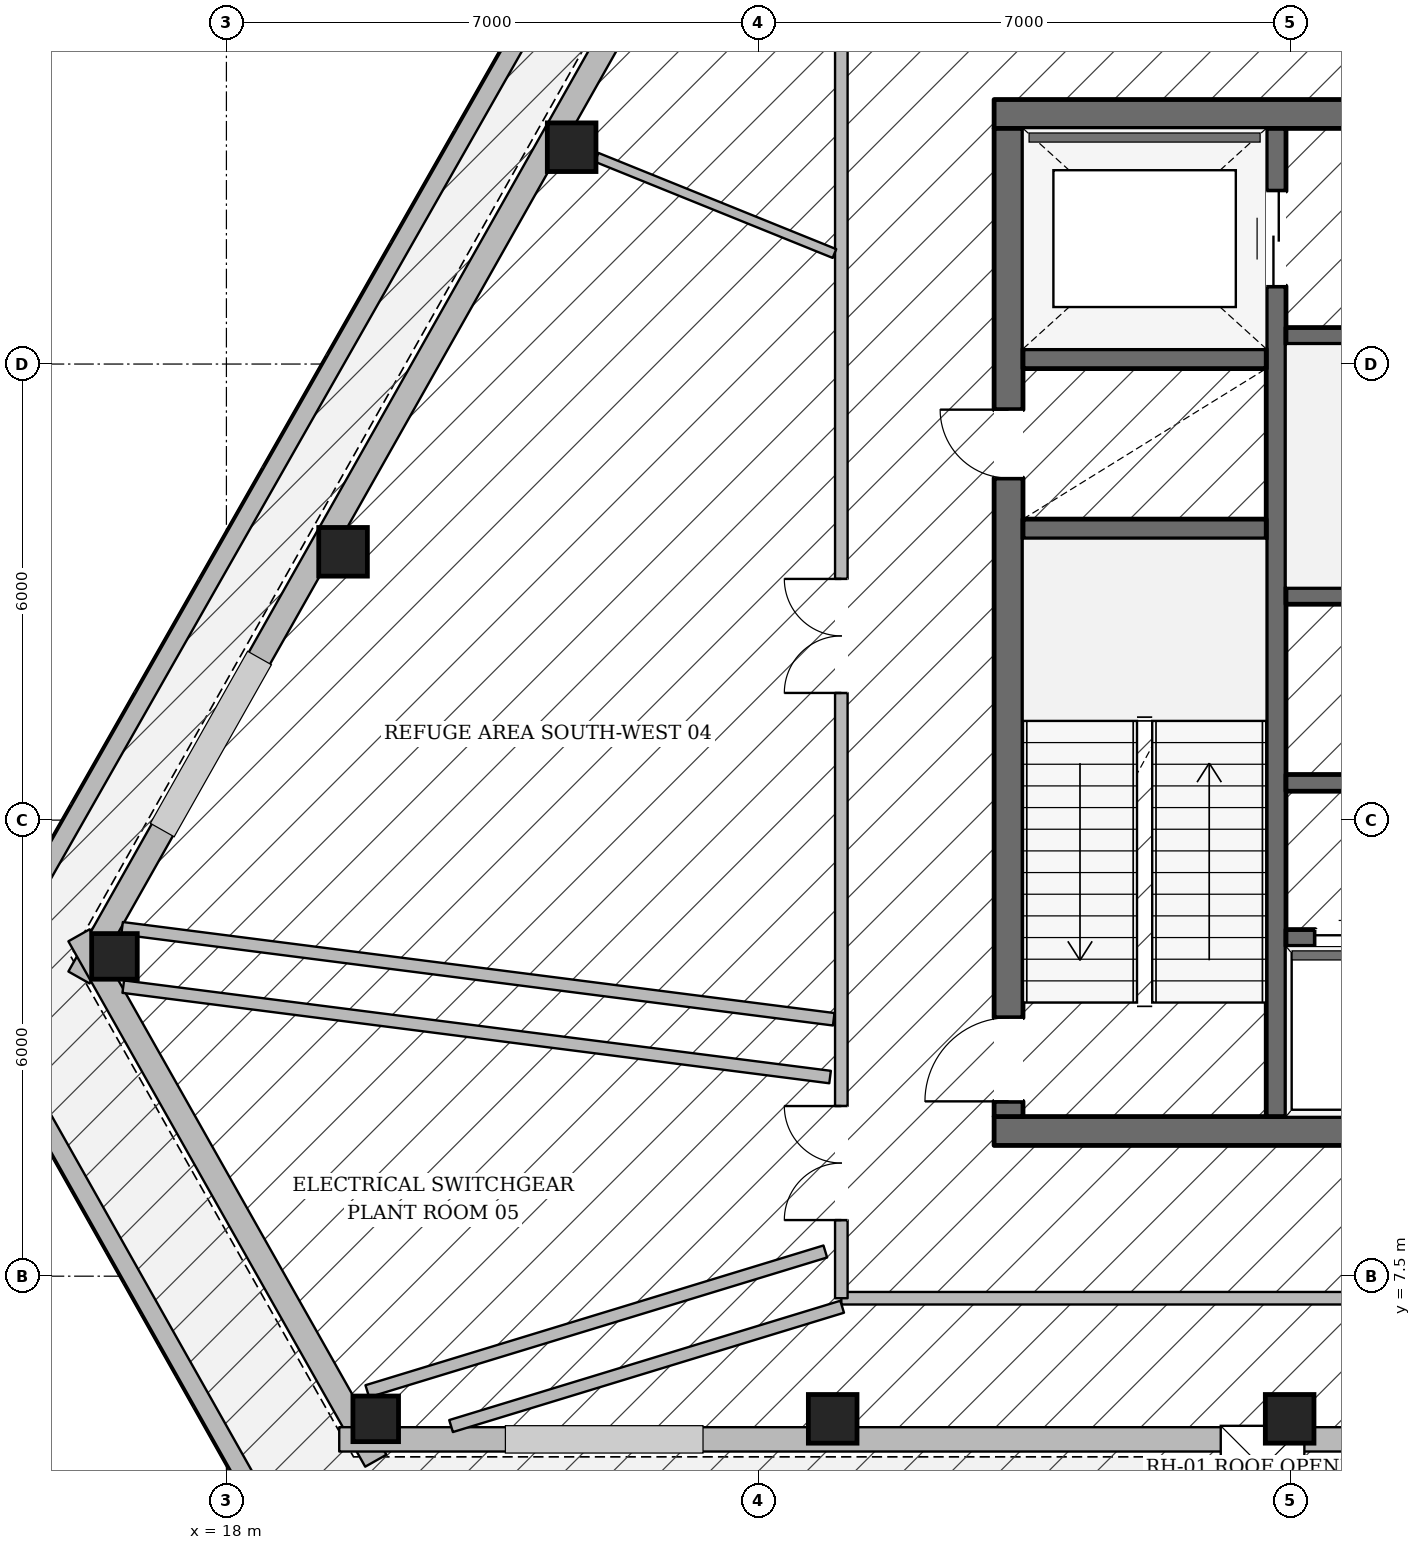
"""IFC4 building model, lengths in metres.
Left out: names, types, materials, properties, quantities, classifications, styles, units other than length and angle.
Written with IfcOpenShell. Run it as: python <this file> out.ifc"""

import sys

from ifc_helpers import new_model, si_unit, direction, frame, frame_2d, origin, origin_2d, place, context, subcontext, project, spatial, rectangle, hollow_rectangle, extrude, element, fill, save


model = new_model("IFC4")
c1 = context("Model", 3, precision=1e-05, world=origin(), true_north=direction((0.0, 1.0)))
c2 = subcontext(c1, "Body", "Model", "MODEL_VIEW")
j1 = project(units=[si_unit("LENGTHUNIT", "METRE"), si_unit("PLANEANGLEUNIT", "RADIAN")], contexts=[c1])
p1 = place(None, origin())
s1 = spatial("IfcSite", under=j1, at=p1, CompositionType="ELEMENT")
p2 = place(p1, origin())
s2 = spatial("IfcBuilding", under=s1, at=p2, CompositionType="ELEMENT")
p3 = place(p2, frame((0.0, 0.0, 234.3)))
s3 = spatial("IfcBuildingStorey", under=s2, at=p3, CompositionType="ELEMENT", Elevation=234.3)
p4 = place(p3, frame((28.1, 9.41, 0.0), z_axis=(0.0, 0.0, 1.0), x_axis=(1.0, 0.0, 0.0)))
e1 = element("IfcWall", 1, at=p4, inside=s3, PredefinedType="SOLIDWALL", context=c2, shape_type="SweptSolid", body=[
    extrude(rectangle(XDim=19.8, YDim=0.38, at=frame_2d((9.9, 0.0))), origin(), (0.0, 0.0, 1.0), 4.96),
])
p5 = place(p4, frame((10.4, 0.0, 0.0)))
e2 = element("IfcOpeningElement", 2, at=p5, cuts=e1, PredefinedType="OPENING", context=c2, shape_type="SweptSolid", body=[
    extrude(rectangle(XDim=1.4, YDim=2.2, at=frame_2d((0.7, 1.1))), frame((0.0, 0.2, 0.0), z_axis=(0.0, -1.0, 0.0), x_axis=(1.0, 0.0, 0.0)), (0.0, 0.0, 1.0), 0.4),
])
p6 = place(p3, frame((28.1, 22.79, 0.0), z_axis=(0.0, 0.0, 1.0), x_axis=(1.0, 0.0, 0.0)))
e3 = element("IfcWall", 3, at=p6, inside=s3, PredefinedType="SOLIDWALL", context=c2, shape_type="SweptSolid", body=[
    extrude(rectangle(XDim=19.8, YDim=0.38, at=frame_2d((9.9, 0.0))), origin(), (0.0, 0.0, 1.0), 4.96),
])
p7 = place(p6, frame((6.175, 0.0, 0.0)))
e4 = element("IfcOpeningElement", 4, at=p7, cuts=e3, PredefinedType="OPENING", context=c2, shape_type="SweptSolid", body=[
    extrude(rectangle(XDim=1.05, YDim=2.15, at=frame_2d((0.525, 1.075))), frame((0.0, 0.2, 0.0), z_axis=(0.0, -1.0, 0.0), x_axis=(1.0, 0.0, 0.0)), (0.0, 0.0, 1.0), 0.4),
])
p8 = place(p6, frame((12.575, 0.0, 0.0)))
e5 = element("IfcOpeningElement", 5, at=p8, cuts=e3, PredefinedType="OPENING", context=c2, shape_type="SweptSolid", body=[
    extrude(rectangle(XDim=1.05, YDim=2.15, at=frame_2d((0.525, 1.075))), frame((0.0, 0.2, 0.0), z_axis=(0.0, -1.0, 0.0), x_axis=(1.0, 0.0, 0.0)), (0.0, 0.0, 1.0), 0.4),
])
p9 = place(p3, frame((28.29, 9.6, 0.0), z_axis=(0.0, 0.0, 1.0), x_axis=(0.0, 1.0, 0.0)))
e6 = element("IfcWall", 6, at=p9, inside=s3, PredefinedType="SOLIDWALL", context=c2, shape_type="SweptSolid", body=[
    extrude(rectangle(XDim=13.0, YDim=0.38, at=frame_2d((6.5, 0.0))), origin(), (0.0, 0.0, 1.0), 4.96),
])
p10 = place(p9, frame((0.2, 0.0, 0.0)))
e7 = element("IfcOpeningElement", 7, at=p10, cuts=e6, PredefinedType="OPENING", context=c2, shape_type="SweptSolid", body=[
    extrude(rectangle(XDim=1.1, YDim=2.15, at=frame_2d((0.55, 1.075))), frame((0.0, 0.2, 0.0), z_axis=(0.0, -1.0, 0.0), x_axis=(1.0, 0.0, 0.0)), (0.0, 0.0, 1.0), 0.4),
])
p11 = place(p9, frame((8.4, 0.0, 0.0)))
e8 = element("IfcOpeningElement", 8, at=p11, cuts=e6, PredefinedType="OPENING", context=c2, shape_type="SweptSolid", body=[
    extrude(rectangle(XDim=0.9, YDim=2.1, at=frame_2d((0.45, 1.05))), frame((0.0, 0.2, 0.0), z_axis=(0.0, -1.0, 0.0), x_axis=(1.0, 0.0, 0.0)), (0.0, 0.0, 1.0), 0.4),
])
p12 = place(p3, frame((31.81, 9.6, 0.0), z_axis=(0.0, 0.0, 1.0), x_axis=(0.0, 1.0, 0.0)))
e9 = element("IfcWall", 9, at=p12, inside=s3, PredefinedType="SHEAR", context=c2, shape_type="SweptSolid", body=[
    extrude(rectangle(XDim=13.0, YDim=0.26, at=frame_2d((6.5, 0.0))), origin(), (0.0, 0.0, 1.0), 4.96),
])
p13 = place(p12, frame((10.925, 0.0, 0.0)))
e10 = element("IfcOpeningElement", 10, at=p13, cuts=e9, PredefinedType="OPENING", context=c2, shape_type="SweptSolid", body=[
    extrude(rectangle(XDim=1.25, YDim=2.25, at=frame_2d((0.625, 1.125))), frame((0.0, 0.14, 0.0), z_axis=(0.0, -1.0, 0.0), x_axis=(1.0, 0.0, 0.0)), (0.0, 0.0, 1.0), 0.28),
])
for number, where, z_axis, x_axis in (
    (11, (28.48, 17.33, 0.0), (0.0, 0.0, 1.0), (1.0, 0.0, 0.0)),
    (12, (28.48, 19.57, 0.0), (0.0, 0.0, 1.0), (1.0, 0.0, 0.0)),
):
    element("IfcWall", number, at=place(p3, frame(where, z_axis=z_axis, x_axis=x_axis)), inside=s3, PredefinedType="SHEAR", context=c2, shape_type="SweptSolid", body=[
        extrude(rectangle(XDim=3.2, YDim=0.26, at=frame_2d((1.6, 0.0))), origin(), (0.0, 0.0, 1.0), 4.96),
    ])
p14 = place(p3, frame((31.94, 19.87, 0.0), z_axis=(0.0, 0.0, 1.0), x_axis=(1.0, 0.0, 0.0)))
e13 = element("IfcWall", 13, at=p14, inside=s3, PredefinedType="SOLIDWALL", context=c2, shape_type="SweptSolid", body=[
    extrude(rectangle(XDim=12.12, YDim=0.22, at=frame_2d((6.06, 0.0))), origin(), (0.0, 0.0, 1.0), 4.96),
])
p15 = place(p14, frame((6.3, 0.0, 0.0)))
e14 = element("IfcOpeningElement", 14, at=p15, cuts=e13, PredefinedType="OPENING", context=c2, shape_type="SweptSolid", body=[
    extrude(rectangle(XDim=1.1, YDim=2.15, at=frame_2d((0.55, 1.075))), frame((0.0, 0.12, 0.0), z_axis=(0.0, -1.0, 0.0), x_axis=(1.0, 0.0, 0.0)), (0.0, 0.0, 1.0), 0.24),
])
p16 = place(p14, frame((8.01, 0.0, 0.0)))
e15 = element("IfcOpeningElement", 15, at=p16, cuts=e13, PredefinedType="OPENING", context=c2, shape_type="SweptSolid", body=[
    extrude(rectangle(XDim=0.9, YDim=2.1, at=frame_2d((0.45, 1.05))), frame((0.0, 0.12, 0.0), z_axis=(0.0, -1.0, 0.0), x_axis=(1.0, 0.0, 0.0)), (0.0, 0.0, 1.0), 0.24),
])
p17 = place(p14, frame((10.21, 0.0, 0.0)))
e16 = element("IfcOpeningElement", 16, at=p17, cuts=e13, PredefinedType="OPENING", context=c2, shape_type="SweptSolid", body=[
    extrude(rectangle(XDim=0.9, YDim=2.1, at=frame_2d((0.45, 1.05))), frame((0.0, 0.12, 0.0), z_axis=(0.0, -1.0, 0.0), x_axis=(1.0, 0.0, 0.0)), (0.0, 0.0, 1.0), 0.24),
])
p18 = place(p3, frame((31.94, 16.45, 0.0), z_axis=(0.0, 0.0, 1.0), x_axis=(1.0, 0.0, 0.0)))
e17 = element("IfcWall", 17, at=p18, inside=s3, PredefinedType="SOLIDWALL", context=c2, shape_type="SweptSolid", body=[
    extrude(rectangle(XDim=12.12, YDim=0.22, at=frame_2d((6.06, 0.0))), origin(), (0.0, 0.0, 1.0), 4.96),
])
p19 = place(p3, frame((31.94, 13.99, 0.0), z_axis=(0.0, 0.0, 1.0), x_axis=(1.0, 0.0, 0.0)))
e18 = element("IfcWall", 18, at=p19, inside=s3, PredefinedType="SOLIDWALL", context=c2, shape_type="SweptSolid", body=[
    extrude(rectangle(XDim=12.12, YDim=0.22, at=frame_2d((6.06, 0.0))), origin(), (0.0, 0.0, 1.0), 4.96),
])
p20 = place(p19, frame((3.11, 0.0, 0.0)))
e19 = element("IfcOpeningElement", 19, at=p20, cuts=e18, PredefinedType="OPENING", context=c2, shape_type="SweptSolid", body=[
    extrude(rectangle(XDim=0.9, YDim=2.1, at=frame_2d((0.45, 1.05))), frame((0.0, 0.12, 0.0), z_axis=(0.0, -1.0, 0.0), x_axis=(1.0, 0.0, 0.0)), (0.0, 0.0, 1.0), 0.24),
])
p21 = place(p19, frame((9.21, 0.0, 0.0)))
e20 = element("IfcOpeningElement", 20, at=p21, cuts=e18, PredefinedType="OPENING", context=c2, shape_type="SweptSolid", body=[
    extrude(rectangle(XDim=0.9, YDim=2.1, at=frame_2d((0.45, 1.05))), frame((0.0, 0.12, 0.0), z_axis=(0.0, -1.0, 0.0), x_axis=(1.0, 0.0, 0.0)), (0.0, 0.0, 1.0), 0.24),
])
p22 = place(p3, frame((31.94, 11.95, 0.0), z_axis=(0.0, 0.0, 1.0), x_axis=(1.0, 0.0, 0.0)))
e21 = element("IfcWall", 21, at=p22, inside=s3, PredefinedType="SOLIDWALL", context=c2, shape_type="SweptSolid", body=[
    extrude(rectangle(XDim=6.19, YDim=0.22, at=frame_2d((3.095, 0.0))), origin(), (0.0, 0.0, 1.0), 4.96),
])
p23 = place(p22, frame((0.385, 0.0, 0.0)))
e22 = element("IfcOpeningElement", 22, at=p23, cuts=e21, PredefinedType="OPENING", context=c2, shape_type="SweptSolid", body=[
    extrude(rectangle(XDim=1.1, YDim=2.2, at=frame_2d((0.55, 1.1))), frame((0.0, 0.12, 0.0), z_axis=(0.0, -1.0, 0.0), x_axis=(1.0, 0.0, 0.0)), (0.0, 0.0, 1.0), 0.24),
])
p24 = place(p22, frame((2.435, 0.0, 0.0)))
e23 = element("IfcOpeningElement", 23, at=p24, cuts=e21, PredefinedType="OPENING", context=c2, shape_type="SweptSolid", body=[
    extrude(rectangle(XDim=1.1, YDim=2.2, at=frame_2d((0.55, 1.1))), frame((0.0, 0.12, 0.0), z_axis=(0.0, -1.0, 0.0), x_axis=(1.0, 0.0, 0.0)), (0.0, 0.0, 1.0), 0.24),
])
p25 = place(p22, frame((4.485, 0.0, 0.0)))
e24 = element("IfcOpeningElement", 24, at=p25, cuts=e21, PredefinedType="OPENING", context=c2, shape_type="SweptSolid", body=[
    extrude(rectangle(XDim=1.1, YDim=2.2, at=frame_2d((0.55, 1.1))), frame((0.0, 0.12, 0.0), z_axis=(0.0, -1.0, 0.0), x_axis=(1.0, 0.0, 0.0)), (0.0, 0.0, 1.0), 0.24),
])
for number, where, z_axis, x_axis in (
    (25, (22.542, 22.353, 0.0), (0.0, 0.0, 1.0), (1.0, 0.0, 0.0)),
    (26, (19.535, 17.03, 0.0), (0.0, 0.0, 1.0), (1.0, 0.0, 0.0)),
):
    element("IfcColumn", number, at=place(p3, frame(where, z_axis=z_axis, x_axis=x_axis)), inside=s3, PredefinedType="COLUMN", context=c2, shape_type="SweptSolid", body=[
        extrude(hollow_rectangle(XDim=0.64, YDim=0.64, WallThickness=0.028, at=origin_2d()), origin(), (0.0, 0.0, 1.0), 4.96),
    ])
for number, where, z_axis, x_axis in (
    (27, (16.527, 11.707, 0.0), (0.0, 0.0, 1.0), (1.0, 0.0, 0.0)),
    (28, (19.965, 5.623, 0.0), (0.0, 0.0, 1.0), (1.0, 0.0, 0.0)),
):
    element("IfcColumn", number, at=place(p3, frame(where, z_axis=z_axis, x_axis=x_axis)), inside=s3, PredefinedType="COLUMN", context=c2, shape_type="SweptSolid", body=[
        extrude(hollow_rectangle(XDim=0.6, YDim=0.6, WallThickness=0.028, at=origin_2d()), origin(), (0.0, 0.0, 1.0), 4.96),
    ])
for number, where, z_axis, x_axis in (
    (29, (25.976, 5.623, 0.0), (0.0, 0.0, 1.0), (1.0, 0.0, 0.0)),
    (30, (31.988, 5.623, 0.0), (0.0, 0.0, 1.0), (1.0, 0.0, 0.0)),
):
    element("IfcColumn", number, at=place(p3, frame(where, z_axis=z_axis, x_axis=x_axis)), inside=s3, PredefinedType="COLUMN", context=c2, shape_type="SweptSolid", body=[
        extrude(hollow_rectangle(XDim=0.64, YDim=0.64, WallThickness=0.028, at=origin_2d()), origin(), (0.0, 0.0, 1.0), 4.96),
    ])
p26 = place(p3, frame((16.06, 11.43, 0.0), z_axis=(0.0, 0.0, 1.0), x_axis=(0.491919583937, 0.87064063938, 0.0)))
e31 = element("IfcWall", 31, at=p26, inside=s3, PredefinedType="STANDARD", context=c2, shape_type="SweptSolid", body=[
    extrude(rectangle(XDim=37.633, YDim=0.32, at=frame_2d((18.816, 0.0))), origin(), (0.0, 0.0, 1.0), 3.652),
])
p27 = place(p3, frame((19.966, 5.073, 0.0), z_axis=(0.0, 0.0, 1.0), x_axis=(-0.491920449469, 0.870640150346, 0.0)))
e32 = element("IfcWall", 32, at=p27, inside=s3, PredefinedType="STANDARD", context=c2, shape_type="SweptSolid", body=[
    extrude(rectangle(XDim=7.939, YDim=0.32, at=frame_2d((3.969, 0.0))), origin(), (0.0, 0.0, 1.0), 3.652),
])
p28 = place(p3, frame((56.516, 5.353, 0.0), z_axis=(0.0, 0.0, 1.0), x_axis=(-1.0, 0.0, 0.0)))
e33 = element("IfcWall", 33, at=p28, inside=s3, PredefinedType="STANDARD", context=c2, shape_type="SweptSolid", body=[
    extrude(rectangle(XDim=37.031, YDim=0.32, at=frame_2d((18.516, 0.0))), origin(), (0.0, 0.0, 1.0), 3.652),
])
p29 = place(p3, frame((34.148, 45.396, 0.0), z_axis=(0.0, 0.0, 1.0), x_axis=(-0.49469479865, -0.869066773147, 0.0)))
e34 = element("IfcWall", 34, at=p29, inside=s3, PredefinedType="PARAPET", context=c2, shape_type="SweptSolid", body=[
    extrude(rectangle(XDim=39.544, YDim=0.24, at=frame_2d((19.772, 0.0))), origin(), (0.0, 0.0, 1.0), 1.25),
])
p30 = place(p3, frame((14.586, 11.341, 0.0), z_axis=(0.0, 0.0, 1.0), x_axis=(0.491291359086, -0.870995293034, 0.0)))
e35 = element("IfcWall", 35, at=p30, inside=s3, PredefinedType="PARAPET", context=c2, shape_type="SweptSolid", body=[
    extrude(rectangle(XDim=8.279, YDim=0.24, at=frame_2d((4.14, 0.0))), origin(), (0.0, 0.0, 1.0), 1.25),
])
p31 = place(p3, frame((26.09, 7.21, 0.0), z_axis=(0.0, 0.0, 1.0), x_axis=(1.0, 0.0, 0.0)))
e36 = element("IfcWall", 36, at=p31, inside=s3, PredefinedType="PARTITIONING", context=c2, shape_type="SweptSolid", body=[
    extrude(rectangle(XDim=23.82, YDim=0.165, at=frame_2d((11.91, 0.0))), origin(), (0.0, 0.0, 1.0), 4.96),
])
p32 = place(p31, frame((11.16, 0.0, 0.0)))
e37 = element("IfcOpeningElement", 37, at=p32, cuts=e36, PredefinedType="OPENING", context=c2, shape_type="SweptSolid", body=[
    extrude(rectangle(XDim=1.5, YDim=2.25, at=frame_2d((0.75, 1.125))), frame((0.0, 0.093, 0.0), z_axis=(0.0, -1.0, 0.0), x_axis=(1.0, 0.0, 0.0)), (0.0, 0.0, 1.0), 0.185),
])
p33 = place(p3, frame((26.09, 7.21, 0.0), z_axis=(0.0, 0.0, 1.0), x_axis=(0.0, 1.0, 0.0)))
e38 = element("IfcWall", 38, at=p33, inside=s3, PredefinedType="PARTITIONING", context=c2, shape_type="SweptSolid", body=[
    extrude(rectangle(XDim=17.78, YDim=0.165, at=frame_2d((8.89, 0.0))), origin(), (0.0, 0.0, 1.0), 4.699),
])
p34 = place(p33, frame((7.963, 0.0, 0.0)))
e39 = element("IfcOpeningElement", 39, at=p34, cuts=e38, PredefinedType="OPENING", context=c2, shape_type="SweptSolid", body=[
    extrude(rectangle(XDim=1.5, YDim=2.25, at=frame_2d((0.75, 1.125))), frame((0.0, 0.093, 0.0), z_axis=(0.0, -1.0, 0.0), x_axis=(1.0, 0.0, 0.0)), (0.0, 0.0, 1.0), 0.185),
])
p35 = place(p33, frame((1.028, 0.0, 0.0)))
e40 = element("IfcOpeningElement", 40, at=p35, cuts=e38, PredefinedType="OPENING", context=c2, shape_type="SweptSolid", body=[
    extrude(rectangle(XDim=1.5, YDim=2.25, at=frame_2d((0.75, 1.125))), frame((0.0, 0.093, 0.0), z_axis=(0.0, -1.0, 0.0), x_axis=(1.0, 0.0, 0.0)), (0.0, 0.0, 1.0), 0.185),
])
p36 = place(p3, frame((25.942, 10.12, 0.0), z_axis=(0.0, 0.0, 1.0), x_axis=(-0.991918429115, 0.126877224045, 0.0)))
e41 = element("IfcWall", 41, at=p36, inside=s3, PredefinedType="PARTITIONING", context=c2, shape_type="SweptSolid", body=[
    extrude(rectangle(XDim=9.375, YDim=0.165, at=frame_2d((4.688, 0.0))), origin(), (0.0, 0.0, 1.0), 4.699),
])
p37 = place(p3, frame((25.99, 10.88, 0.0), z_axis=(0.0, 0.0, 1.0), x_axis=(-0.991919681507, 0.126867432537, 0.0)))
e42 = element("IfcWall", 42, at=p37, inside=s3, PredefinedType="PARTITIONING", context=c2, shape_type="SweptSolid", body=[
    extrude(rectangle(XDim=9.439, YDim=0.165, at=frame_2d((4.719, 0.0))), origin(), (0.0, 0.0, 1.0), 4.96),
])
p38 = place(p3, frame((26.101, 7.098, 0.0), z_axis=(0.0, 0.0, 1.0), x_axis=(-0.956485702971, -0.291779197362, 0.0)))
e43 = element("IfcWall", 43, at=p38, inside=s3, PredefinedType="PARTITIONING", context=c2, shape_type="SweptSolid", body=[
    extrude(rectangle(XDim=5.379, YDim=0.165, at=frame_2d((2.69, 0.0))), origin(), (0.0, 0.0, 1.0), 3.655),
])
p39 = place(p3, frame((25.879, 7.825, 0.0), z_axis=(0.0, 0.0, 1.0), x_axis=(-0.956485946224, -0.291778399948, 0.0)))
e44 = element("IfcWall", 44, at=p39, inside=s3, PredefinedType="PARTITIONING", context=c2, shape_type="SweptSolid", body=[
    extrude(rectangle(XDim=6.3, YDim=0.165, at=frame_2d((3.15, 0.0))), origin(), (0.0, 0.0, 1.0), 4.96),
])
p40 = place(p3, frame((26.0, 20.954, 0.0), z_axis=(0.0, 0.0, 1.0), x_axis=(-0.927028237723, 0.374991528522, 0.0)))
e45 = element("IfcWall", 45, at=p40, inside=s3, PredefinedType="PARTITIONING", context=c2, shape_type="SweptSolid", body=[
    extrude(rectangle(XDim=3.376, YDim=0.125, at=frame_2d((1.688, 0.0))), origin(), (0.0, 0.0, 1.0), 3.655),
])
p41 = place(p3, frame((0.0, 0.0, -0.22)))
p42 = place(p41, frame((31.632, 4.981, 0.0)))
p43 = place(p42, frame((0.0, 0.0, 0.17)))
e46 = element("IfcWindow", 46, at=p43, inside=s3, PartitioningType="SINGLE_PANEL", PredefinedType="SKYLIGHT", context=c2, shape_type="SweptSolid", body=[
    extrude(rectangle(XDim=1.1, YDim=1.1, at=origin_2d()), origin(), (0.0, 0.0, 1.0), 0.05),
])
p44 = place(p10, origin())
e47 = element("IfcDoor", 47, at=p44, inside=s3, OperationType="SINGLE_SWING_LEFT", PredefinedType="DOOR", context=c2, shape_type="SweptSolid", body=[
    extrude(rectangle(XDim=1.1, YDim=2.15, at=frame_2d((0.55, 1.075))), frame((0.0, 0.025, 0.0), z_axis=(0.0, -1.0, 0.0), x_axis=(1.0, 0.0, 0.0)), (0.0, 0.0, 1.0), 0.05),
])
fill(e7, e47)
p45 = place(p11, origin())
e48 = element("IfcDoor", 48, at=p45, inside=s3, OperationType="SINGLE_SWING_RIGHT", PredefinedType="DOOR", context=c2, shape_type="SweptSolid", body=[
    extrude(rectangle(XDim=0.9, YDim=2.1, at=frame_2d((0.45, 1.05))), frame((0.0, 0.025, 0.0), z_axis=(0.0, -1.0, 0.0), x_axis=(1.0, 0.0, 0.0)), (0.0, 0.0, 1.0), 0.05),
])
fill(e8, e48)
p46 = place(p13, origin())
e49 = element("IfcDoor", 49, at=p46, inside=s3, OperationType="DOUBLE_DOOR_SLIDING", PredefinedType="DOOR", context=c2, shape_type="SweptSolid", body=[
    extrude(rectangle(XDim=1.25, YDim=2.25, at=frame_2d((0.625, 1.125))), frame((0.0, 0.025, 0.0), z_axis=(0.0, -1.0, 0.0), x_axis=(1.0, 0.0, 0.0)), (0.0, 0.0, 1.0), 0.05),
])
fill(e10, e49)
p47 = place(p23, origin())
e50 = element("IfcDoor", 50, at=p47, inside=s3, OperationType="DOUBLE_DOOR_SLIDING", PredefinedType="DOOR", context=c2, shape_type="SweptSolid", body=[
    extrude(rectangle(XDim=1.1, YDim=2.2, at=frame_2d((0.55, 1.1))), frame((0.0, 0.025, 0.0), z_axis=(0.0, -1.0, 0.0), x_axis=(1.0, 0.0, 0.0)), (0.0, 0.0, 1.0), 0.05),
])
fill(e22, e50)
p48 = place(p34, origin())
e51 = element("IfcDoor", 51, at=p48, inside=s3, OperationType="DOUBLE_DOOR_SINGLE_SWING", PredefinedType="DOOR", context=c2, shape_type="SweptSolid", body=[
    extrude(rectangle(XDim=1.5, YDim=2.25, at=frame_2d((0.75, 1.125))), frame((0.0, 0.025, 0.0), z_axis=(0.0, -1.0, 0.0), x_axis=(1.0, 0.0, 0.0)), (0.0, 0.0, 1.0), 0.05),
])
fill(e39, e51)
p49 = place(p35, origin())
e52 = element("IfcDoor", 52, at=p49, inside=s3, OperationType="DOUBLE_DOOR_SINGLE_SWING", PredefinedType="DOOR", context=c2, shape_type="SweptSolid", body=[
    extrude(rectangle(XDim=1.5, YDim=2.25, at=frame_2d((0.75, 1.125))), frame((0.0, 0.025, 0.0), z_axis=(0.0, -1.0, 0.0), x_axis=(1.0, 0.0, 0.0)), (0.0, 0.0, 1.0), 0.05),
])
fill(e40, e52)
save(model, sys.argv[1])
